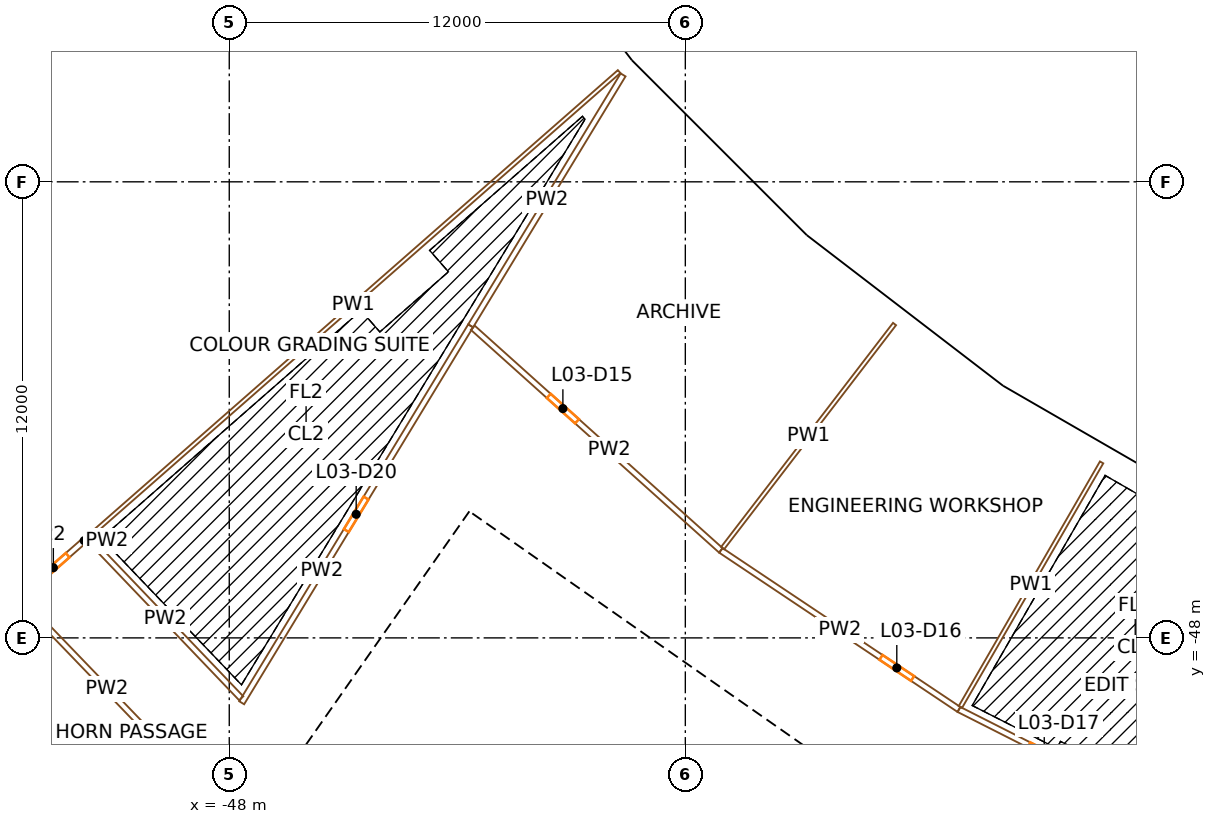
"""IFC4 building model, lengths in metres.
Left out: names, types, materials, properties, quantities, classifications, styles, units other than length and angle.
Written with IfcOpenShell. Run it as: python <this file> out.ifc"""

import sys

from ifc_helpers import new_model, si_unit, direction, frame, frame_2d, origin, origin_2d, place, context, subcontext, project, spatial, rectangle, extrude, element, fill, save


model = new_model("IFC4")
c1 = context("Model", 3, precision=1e-05, world=origin(), true_north=direction((0.0, 1.0)))
c2 = subcontext(c1, "Body", "Model", "MODEL_VIEW")
j1 = project(units=[si_unit("LENGTHUNIT", "METRE"), si_unit("PLANEANGLEUNIT", "RADIAN")], contexts=[c1])
p1 = place(None, origin())
s1 = spatial("IfcSite", under=j1, at=p1, CompositionType="ELEMENT")
p2 = place(p1, origin())
s2 = spatial("IfcBuilding", under=s1, at=p2, CompositionType="ELEMENT")
p3 = place(p2, frame((0.0, 0.0, 27.0)))
s3 = spatial("IfcBuildingStorey", under=s2, at=p3, CompositionType="ELEMENT", Elevation=27.0)
p4 = place(p3, frame((-48.433, -32.362, 0.0), z_axis=(0.0, 0.0, 1.0), x_axis=(0.55557023302, -0.831469612303, 0.0)))
e1 = element("IfcColumn", 1, at=p4, inside=s3, PredefinedType="COLUMN", context=c2, shape_type="SweptSolid", body=[
    extrude(rectangle(XDim=1.4, YDim=1.8, at=origin_2d()), origin(), (0.0, 0.0, 1.0), 4.5),
])
p5 = place(p3, frame((-38.156, -33.462, 0.0), z_axis=(0.0, 0.0, 1.0), x_axis=(0.6593458151, -0.751839807479, 0.0)))
e2 = element("IfcColumn", 2, at=p5, inside=s3, PredefinedType="COLUMN", context=c2, shape_type="SweptSolid", body=[
    extrude(rectangle(XDim=1.1, YDim=1.3, at=origin_2d()), origin(), (0.0, 0.0, 1.0), 4.5),
])
p6 = place(p3, frame((-43.795, -38.407, 0.0), z_axis=(0.0, 0.0, 1.0), x_axis=(0.6593458151, -0.751839807479, 0.0)))
e3 = element("IfcColumn", 3, at=p6, inside=s3, PredefinedType="COLUMN", context=c2, shape_type="SweptSolid", body=[
    extrude(rectangle(XDim=1.4, YDim=1.8, at=origin_2d()), origin(), (0.0, 0.0, 1.0), 4.5),
])
p7 = place(p3, frame((-33.462, -38.156, 0.0), z_axis=(0.0, 0.0, 1.0), x_axis=(0.751839807479, -0.6593458151, 0.0)))
e4 = element("IfcColumn", 4, at=p7, inside=s3, PredefinedType="COLUMN", context=c2, shape_type="SweptSolid", body=[
    extrude(rectangle(XDim=1.1, YDim=1.3, at=origin_2d()), origin(), (0.0, 0.0, 1.0), 4.5),
])
p8 = place(p3, frame((-38.407, -43.795, 0.0), z_axis=(0.0, 0.0, 1.0), x_axis=(0.751839807479, -0.6593458151, 0.0)))
e5 = element("IfcColumn", 5, at=p8, inside=s3, PredefinedType="COLUMN", context=c2, shape_type="SweptSolid", body=[
    extrude(rectangle(XDim=1.4, YDim=1.8, at=origin_2d()), origin(), (0.0, 0.0, 1.0), 4.5),
])
p9 = place(p3, frame((-28.195, -42.197, 0.0), z_axis=(0.0, 0.0, 1.0), x_axis=(0.831469612303, -0.55557023302, 0.0)))
e6 = element("IfcColumn", 6, at=p9, inside=s3, PredefinedType="COLUMN", context=c2, shape_type="SweptSolid", body=[
    extrude(rectangle(XDim=1.1, YDim=1.3, at=origin_2d()), origin(), (0.0, 0.0, 1.0), 4.5),
])
p10 = place(p3, frame((-32.362, -48.433, 0.0), z_axis=(0.0, 0.0, 1.0), x_axis=(0.831469612303, -0.55557023302, 0.0)))
e7 = element("IfcColumn", 7, at=p10, inside=s3, PredefinedType="COLUMN", context=c2, shape_type="SweptSolid", body=[
    extrude(rectangle(XDim=1.4, YDim=1.8, at=origin_2d()), origin(), (0.0, 0.0, 1.0), 4.5),
])
p11 = place(p3, frame((-49.779, -57.191, 0.0), z_axis=(0.0, 0.0, 1.0), x_axis=(0.573577477574, 0.819151315216, 0.0)))
e8 = element("IfcWall", 8, at=p11, inside=s3, PredefinedType="SHEAR", context=c2, shape_type="SweptSolid", body=[
    extrude(rectangle(XDim=14.8, YDim=0.9, at=frame_2d((7.4, 0.0))), origin(), (0.0, 0.0, 1.0), 4.1),
])
p12 = place(p11, frame((6.7, 0.0, 0.0)))
e9 = element("IfcOpeningElement", 9, at=p12, cuts=e8, PredefinedType="OPENING", context=c2, shape_type="SweptSolid", body=[
    extrude(rectangle(XDim=1.4, YDim=2.1, at=frame_2d((0.7, 1.05))), frame((0.0, 0.46, 0.0), z_axis=(0.0, -1.0, 0.0), x_axis=(1.0, 0.0, 0.0)), (0.0, 0.0, 1.0), 0.92),
])
p13 = place(p3, frame((-28.854, -54.324, 0.0), z_axis=(0.0, 0.0, 1.0), x_axis=(-0.819145767589, 0.573585400304, 0.0)))
e10 = element("IfcWall", 10, at=p13, inside=s3, PredefinedType="SHEAR", context=c2, shape_type="SweptSolid", body=[
    extrude(rectangle(XDim=15.045, YDim=0.9, at=frame_2d((7.523, 0.0))), origin(), (0.0, 0.0, 1.0), 4.1),
])
p14 = place(p13, frame((0.6, 0.0, 0.0)))
e11 = element("IfcOpeningElement", 11, at=p14, cuts=e10, PredefinedType="OPENING", context=c2, shape_type="SweptSolid", body=[
    extrude(rectangle(XDim=1.0, YDim=2.1, at=frame_2d((0.5, 1.05))), frame((0.0, 0.46, 0.0), z_axis=(0.0, -1.0, 0.0), x_axis=(1.0, 0.0, 0.0)), (0.0, 0.0, 1.0), 0.92),
])
p15 = place(p13, frame((3.275, 0.0, 0.0)))
e12 = element("IfcOpeningElement", 12, at=p15, cuts=e10, PredefinedType="OPENING", context=c2, shape_type="SweptSolid", body=[
    extrude(rectangle(XDim=1.0, YDim=2.1, at=frame_2d((0.5, 1.05))), frame((0.0, 0.46, 0.0), z_axis=(0.0, -1.0, 0.0), x_axis=(1.0, 0.0, 0.0)), (0.0, 0.0, 1.0), 0.92),
])
p16 = place(p13, frame((6.225, 0.0, 0.0)))
e13 = element("IfcOpeningElement", 13, at=p16, cuts=e10, PredefinedType="OPENING", context=c2, shape_type="SweptSolid", body=[
    extrude(rectangle(XDim=0.9, YDim=2.1, at=frame_2d((0.45, 1.05))), frame((0.0, 0.46, 0.0), z_axis=(0.0, -1.0, 0.0), x_axis=(1.0, 0.0, 0.0)), (0.0, 0.0, 1.0), 0.92),
])
p17 = place(p13, frame((13.495, 0.0, 0.0)))
e14 = element("IfcOpeningElement", 14, at=p17, cuts=e10, PredefinedType="OPENING", context=c2, shape_type="SweptSolid", body=[
    extrude(rectangle(XDim=1.1, YDim=2.1, at=frame_2d((0.55, 1.05))), frame((0.0, 0.46, 0.0), z_axis=(0.0, -1.0, 0.0), x_axis=(1.0, 0.0, 0.0)), (0.0, 0.0, 1.0), 0.92),
])
p18 = place(p3, frame((-43.204, -60.696, 0.0), z_axis=(0.0, 0.0, 1.0), x_axis=(0.573571992966, 0.819155155563, 0.0)))
e15 = element("IfcWall", 15, at=p18, inside=s3, PredefinedType="SOLIDWALL", context=c2, shape_type="SweptSolid", body=[
    extrude(rectangle(XDim=13.0, YDim=0.3, at=frame_2d((6.5, 0.0))), origin(), (0.0, 0.0, 1.0), 4.1),
])
p19 = place(p3, frame((-37.936, -52.91, 0.0), z_axis=(0.0, 0.0, 1.0), x_axis=(-0.819147518138, 0.57358290031, 0.0)))
e16 = element("IfcWall", 16, at=p19, inside=s3, PredefinedType="SOLIDWALL", context=c2, shape_type="SweptSolid", body=[
    extrude(rectangle(XDim=6.795, YDim=0.3, at=frame_2d((3.398, 0.0))), origin(), (0.0, 0.0, 1.0), 4.1),
])
p20 = place(p19, frame((5.32, 0.0, 0.0)))
e17 = element("IfcOpeningElement", 17, at=p20, cuts=e16, PredefinedType="OPENING", context=c2, shape_type="SweptSolid", body=[
    extrude(rectangle(XDim=1.1, YDim=2.1, at=frame_2d((0.55, 1.05))), frame((0.0, 0.16, 0.0), z_axis=(0.0, -1.0, 0.0), x_axis=(1.0, 0.0, 0.0)), (0.0, 0.0, 1.0), 0.32),
])
p21 = place(p3, frame((-37.555, -32.975, 0.0), z_axis=(0.0, 0.0, 1.0), x_axis=(-0.608780327927, 0.793338838284, 0.0)))
e18 = element("IfcWall", 18, at=p21, inside=s3, PredefinedType="SOLIDWALL", context=c2, shape_type="SweptSolid", body=[
    extrude(rectangle(XDim=6.597, YDim=0.45, at=frame_2d((3.298, 0.0))), origin(), (0.0, 0.0, 1.0), 3.2),
])
p22 = place(p21, frame((3.749, 0.0, 0.9)))
e19 = element("IfcOpeningElement", 19, at=p22, cuts=e18, PredefinedType="OPENING", context=c2, shape_type="SweptSolid", body=[
    extrude(rectangle(XDim=1.2, YDim=2.15, at=frame_2d((0.6, 1.075))), frame((0.0, 0.235, 0.0), z_axis=(0.0, -1.0, 0.0), x_axis=(1.0, 0.0, 0.0)), (0.0, 0.0, 1.0), 0.47),
])
p23 = place(p21, frame((1.648, 0.0, 0.9)))
e20 = element("IfcOpeningElement", 20, at=p23, cuts=e18, PredefinedType="OPENING", context=c2, shape_type="SweptSolid", body=[
    extrude(rectangle(XDim=1.2, YDim=2.15, at=frame_2d((0.6, 1.075))), frame((0.0, 0.235, 0.0), z_axis=(0.0, -1.0, 0.0), x_axis=(1.0, 0.0, 0.0)), (0.0, 0.0, 1.0), 0.47),
])
p24 = place(p3, frame((-32.993, -37.532, 0.0), z_axis=(0.0, 0.0, 1.0), x_axis=(-0.707106781187, 0.707106781187, 0.0)))
e21 = element("IfcWall", 21, at=p24, inside=s3, PredefinedType="SOLIDWALL", context=c2, shape_type="SweptSolid", body=[
    extrude(rectangle(XDim=6.419, YDim=0.45, at=frame_2d((3.209, 0.0))), origin(), (0.0, 0.0, 1.0), 3.2),
])
p25 = place(p24, frame((3.66, 0.0, 0.9)))
e22 = element("IfcOpeningElement", 22, at=p25, cuts=e21, PredefinedType="OPENING", context=c2, shape_type="SweptSolid", body=[
    extrude(rectangle(XDim=1.2, YDim=2.15, at=frame_2d((0.6, 1.075))), frame((0.0, 0.235, 0.0), z_axis=(0.0, -1.0, 0.0), x_axis=(1.0, 0.0, 0.0)), (0.0, 0.0, 1.0), 0.47),
])
p26 = place(p24, frame((1.56, 0.0, 0.9)))
e23 = element("IfcOpeningElement", 23, at=p26, cuts=e21, PredefinedType="OPENING", context=c2, shape_type="SweptSolid", body=[
    extrude(rectangle(XDim=1.2, YDim=2.15, at=frame_2d((0.6, 1.075))), frame((0.0, 0.235, 0.0), z_axis=(0.0, -1.0, 0.0), x_axis=(1.0, 0.0, 0.0)), (0.0, 0.0, 1.0), 0.47),
])
p27 = place(p3, frame((-27.741, -41.571, 0.0), z_axis=(0.0, 0.0, 1.0), x_axis=(-0.793338838284, 0.608780327927, 0.0)))
e24 = element("IfcWall", 24, at=p27, inside=s3, PredefinedType="SOLIDWALL", context=c2, shape_type="SweptSolid", body=[
    extrude(rectangle(XDim=6.597, YDim=0.45, at=frame_2d((3.298, 0.0))), origin(), (0.0, 0.0, 1.0), 3.2),
])
p28 = place(p27, frame((3.749, 0.0, 0.9)))
e25 = element("IfcOpeningElement", 25, at=p28, cuts=e24, PredefinedType="OPENING", context=c2, shape_type="SweptSolid", body=[
    extrude(rectangle(XDim=1.2, YDim=2.15, at=frame_2d((0.6, 1.075))), frame((0.0, 0.235, 0.0), z_axis=(0.0, -1.0, 0.0), x_axis=(1.0, 0.0, 0.0)), (0.0, 0.0, 1.0), 0.47),
])
p29 = place(p27, frame((1.648, 0.0, 0.9)))
e26 = element("IfcOpeningElement", 26, at=p29, cuts=e24, PredefinedType="OPENING", context=c2, shape_type="SweptSolid", body=[
    extrude(rectangle(XDim=1.2, YDim=2.15, at=frame_2d((0.6, 1.075))), frame((0.0, 0.235, 0.0), z_axis=(0.0, -1.0, 0.0), x_axis=(1.0, 0.0, 0.0)), (0.0, 0.0, 1.0), 0.47),
])
p30 = place(p3, frame((-22.155, -44.792, 0.0), z_axis=(0.0, 0.0, 1.0), x_axis=(-0.866022817921, 0.50000447882, 0.0)))
e27 = element("IfcWall", 27, at=p30, inside=s3, PredefinedType="SOLIDWALL", context=c2, shape_type="SweptSolid", body=[
    extrude(rectangle(XDim=6.419, YDim=0.45, at=frame_2d((3.21, 0.0))), origin(), (0.0, 0.0, 1.0), 3.2),
])
p31 = place(p30, frame((3.66, 0.0, 0.9)))
e28 = element("IfcOpeningElement", 28, at=p31, cuts=e27, PredefinedType="OPENING", context=c2, shape_type="SweptSolid", body=[
    extrude(rectangle(XDim=1.2, YDim=2.15, at=frame_2d((0.6, 1.075))), frame((0.0, 0.235, 0.0), z_axis=(0.0, -1.0, 0.0), x_axis=(1.0, 0.0, 0.0)), (0.0, 0.0, 1.0), 0.47),
])
p32 = place(p30, frame((1.56, 0.0, 0.9)))
e29 = element("IfcOpeningElement", 29, at=p32, cuts=e27, PredefinedType="OPENING", context=c2, shape_type="SweptSolid", body=[
    extrude(rectangle(XDim=1.2, YDim=2.15, at=frame_2d((0.6, 1.075))), frame((0.0, 0.235, 0.0), z_axis=(0.0, -1.0, 0.0), x_axis=(1.0, 0.0, 0.0)), (0.0, 0.0, 1.0), 0.47),
])
p33 = place(p3, frame((-53.531, -46.945, 0.0), z_axis=(0.0, 0.0, 1.0), x_axis=(0.751876772813, 0.659303661832, 0.0)))
e30 = element("IfcWall", 30, at=p33, inside=s3, PredefinedType="PARTITIONING", context=c2, shape_type="SweptSolid", body=[
    extrude(rectangle(XDim=2.4, YDim=0.15, at=frame_2d((1.2, 0.0))), origin(), (0.0, 0.0, 1.0), 3.1),
])
p34 = place(p33, frame((0.7, 0.0, 0.0)))
e31 = element("IfcOpeningElement", 31, at=p34, cuts=e30, PredefinedType="OPENING", context=c2, shape_type="SweptSolid", body=[
    extrude(rectangle(XDim=1.0, YDim=2.1, at=frame_2d((0.5, 1.05))), frame((0.0, 0.085, 0.0), z_axis=(0.0, -1.0, 0.0), x_axis=(1.0, 0.0, 0.0)), (0.0, 0.0, 1.0), 0.17),
])
p35 = place(p3, frame((-51.727, -45.363, 0.0), z_axis=(0.0, 0.0, 1.0), x_axis=(0.751835479309, 0.659350750399, 0.0)))
e32 = element("IfcWall", 32, at=p35, inside=s3, PredefinedType="PARTITIONING", context=c2, shape_type="SweptSolid", body=[
    extrude(rectangle(XDim=18.6, YDim=0.1, at=frame_2d((9.3, 0.0))), origin(), (0.0, 0.0, 1.0), 3.1),
])
p36 = place(p3, frame((-48.961, -51.689, 0.0), z_axis=(0.0, 0.0, 1.0), x_axis=(-0.693805223412, 0.72016269826, 0.0)))
e33 = element("IfcWall", 33, at=p36, inside=s3, PredefinedType="PARTITIONING", context=c2, shape_type="SweptSolid", body=[
    extrude(rectangle(XDim=6.512, YDim=0.15, at=frame_2d((3.256, 0.0))), origin(), (0.0, 0.0, 1.0), 3.1),
])
p37 = place(p3, frame((-47.686, -49.589, 0.0), z_axis=(0.0, 0.0, 1.0), x_axis=(-0.691111241065, 0.722748401917, 0.0)))
e34 = element("IfcWall", 34, at=p37, inside=s3, PredefinedType="PARTITIONING", context=c2, shape_type="SweptSolid", body=[
    extrude(rectangle(XDim=5.772, YDim=0.15, at=frame_2d((2.886, 0.0))), origin(), (0.0, 0.0, 1.0), 3.1),
])
p38 = place(p3, frame((-47.673, -49.708, 0.0), z_axis=(0.0, 0.0, 1.0), x_axis=(0.519159839294, 0.854677167862, 0.0)))
e35 = element("IfcWall", 35, at=p38, inside=s3, PredefinedType="PARTITIONING", context=c2, shape_type="SweptSolid", body=[
    extrude(rectangle(XDim=11.605, YDim=0.15, at=frame_2d((5.802, 0.0))), origin(), (0.0, 0.0, 1.0), 3.1),
])
p39 = place(p38, frame((5.302, 0.0, 0.0)))
e36 = element("IfcOpeningElement", 36, at=p39, cuts=e35, PredefinedType="OPENING", context=c2, shape_type="SweptSolid", body=[
    extrude(rectangle(XDim=1.0, YDim=2.1, at=frame_2d((0.5, 1.05))), frame((0.0, 0.085, 0.0), z_axis=(0.0, -1.0, 0.0), x_axis=(1.0, 0.0, 0.0)), (0.0, 0.0, 1.0), 0.17),
])
p40 = place(p3, frame((-41.592, -39.839, 0.0), z_axis=(0.0, 0.0, 1.0), x_axis=(0.744252572607, -0.667898276812, 0.0)))
e37 = element("IfcWall", 37, at=p40, inside=s3, PredefinedType="PARTITIONING", context=c2, shape_type="SweptSolid", body=[
    extrude(rectangle(XDim=8.771, YDim=0.15, at=frame_2d((4.385, 0.0))), origin(), (0.0, 0.0, 1.0), 3.1),
])
p41 = place(p40, frame((2.685, 0.0, 0.0)))
e38 = element("IfcOpeningElement", 38, at=p41, cuts=e37, PredefinedType="OPENING", context=c2, shape_type="SweptSolid", body=[
    extrude(rectangle(XDim=1.0, YDim=2.1, at=frame_2d((0.5, 1.05))), frame((0.0, 0.085, 0.0), z_axis=(0.0, -1.0, 0.0), x_axis=(1.0, 0.0, 0.0)), (0.0, 0.0, 1.0), 0.17),
])
p42 = place(p3, frame((-37.638, -33.187, 0.0), z_axis=(0.0, 0.0, 1.0), x_axis=(-0.519163683086, -0.854674833, 0.0)))
e39 = element("IfcWall", 39, at=p42, inside=s3, PredefinedType="PARTITIONING", context=c2, shape_type="SweptSolid", body=[
    extrude(rectangle(XDim=7.725, YDim=0.15, at=frame_2d((3.862, 0.0))), origin(), (0.0, 0.0, 1.0), 3.1),
])
p43 = place(p3, frame((-35.065, -45.697, 0.0), z_axis=(0.0, 0.0, 1.0), x_axis=(0.831476555368, -0.555559841847, 0.0)))
e40 = element("IfcWall", 40, at=p43, inside=s3, PredefinedType="PARTITIONING", context=c2, shape_type="SweptSolid", body=[
    extrude(rectangle(XDim=7.534, YDim=0.15, at=frame_2d((3.767, 0.0))), origin(), (0.0, 0.0, 1.0), 3.1),
])
p44 = place(p43, frame((5.067, 0.0, 0.0)))
e41 = element("IfcOpeningElement", 41, at=p44, cuts=e40, PredefinedType="OPENING", context=c2, shape_type="SweptSolid", body=[
    extrude(rectangle(XDim=1.0, YDim=2.1, at=frame_2d((0.5, 1.05))), frame((0.0, 0.085, 0.0), z_axis=(0.0, -1.0, 0.0), x_axis=(1.0, 0.0, 0.0)), (0.0, 0.0, 1.0), 0.17),
])
p45 = place(p3, frame((-30.495, -39.742, 0.0), z_axis=(0.0, 0.0, 1.0), x_axis=(-0.60877839598, -0.793340320788, 0.0)))
e42 = element("IfcWall", 42, at=p45, inside=s3, PredefinedType="PARTITIONING", context=c2, shape_type="SweptSolid", body=[
    extrude(rectangle(XDim=7.432, YDim=0.1, at=frame_2d((3.716, 0.0))), origin(), (0.0, 0.0, 1.0), 3.1),
])
p46 = place(p3, frame((-28.8, -49.883, 0.0), z_axis=(0.0, 0.0, 1.0), x_axis=(0.892095791335, -0.451846322418, 0.0)))
e43 = element("IfcWall", 43, at=p46, inside=s3, PredefinedType="PARTITIONING", context=c2, shape_type="SweptSolid", body=[
    extrude(rectangle(XDim=6.231, YDim=0.15, at=frame_2d((3.116, 0.0))), origin(), (0.0, 0.0, 1.0), 3.1),
])
p47 = place(p46, frame((2.066, 0.0, 0.0)))
e44 = element("IfcOpeningElement", 44, at=p47, cuts=e43, PredefinedType="OPENING", context=c2, shape_type="SweptSolid", body=[
    extrude(rectangle(XDim=0.9, YDim=2.1, at=frame_2d((0.45, 1.05))), frame((0.0, 0.085, 0.0), z_axis=(0.0, -1.0, 0.0), x_axis=(1.0, 0.0, 0.0)), (0.0, 0.0, 1.0), 0.17),
])
p48 = place(p3, frame((-25.047, -43.382, 0.0), z_axis=(0.0, 0.0, 1.0), x_axis=(-0.500011569389, -0.866018724091, 0.0)))
e45 = element("IfcWall", 45, at=p48, inside=s3, PredefinedType="PARTITIONING", context=c2, shape_type="SweptSolid", body=[
    extrude(rectangle(XDim=7.431, YDim=0.1, at=frame_2d((3.716, 0.0))), origin(), (0.0, 0.0, 1.0), 3.1),
])
p49 = place(p16, origin())
e46 = element("IfcDoor", 46, at=p49, inside=s3, OperationType="SINGLE_SWING_RIGHT", PredefinedType="DOOR", context=c2, shape_type="SweptSolid", body=[
    extrude(rectangle(XDim=0.9, YDim=2.1, at=frame_2d((0.45, 1.05))), frame((0.0, 0.025, 0.0), z_axis=(0.0, -1.0, 0.0), x_axis=(1.0, 0.0, 0.0)), (0.0, 0.0, 1.0), 0.05),
])
fill(e13, e46)
p50 = place(p12, origin())
e47 = element("IfcDoor", 47, at=p50, inside=s3, OperationType="DOUBLE_DOOR_SINGLE_SWING", PredefinedType="DOOR", context=c2, shape_type="SweptSolid", body=[
    extrude(rectangle(XDim=1.4, YDim=2.1, at=frame_2d((0.7, 1.05))), frame((0.0, 0.025, 0.0), z_axis=(0.0, -1.0, 0.0), x_axis=(1.0, 0.0, 0.0)), (0.0, 0.0, 1.0), 0.05),
])
fill(e9, e47)
p51 = place(p17, origin())
e48 = element("IfcDoor", 48, at=p51, inside=s3, OperationType="SINGLE_SWING_RIGHT", PredefinedType="DOOR", context=c2, shape_type="SweptSolid", body=[
    extrude(rectangle(XDim=1.1, YDim=2.1, at=frame_2d((0.55, 1.05))), frame((0.0, 0.025, 0.0), z_axis=(0.0, -1.0, 0.0), x_axis=(1.0, 0.0, 0.0)), (0.0, 0.0, 1.0), 0.05),
])
fill(e14, e48)
p52 = place(p20, origin())
e49 = element("IfcDoor", 49, at=p52, inside=s3, OperationType="SINGLE_SWING_RIGHT", PredefinedType="DOOR", context=c2, shape_type="SweptSolid", body=[
    extrude(rectangle(XDim=1.1, YDim=2.1, at=frame_2d((0.55, 1.05))), frame((0.0, 0.025, 0.0), z_axis=(0.0, -1.0, 0.0), x_axis=(1.0, 0.0, 0.0)), (0.0, 0.0, 1.0), 0.05),
])
fill(e17, e49)
p53 = place(p25, origin())
e50 = element("IfcWindow", 50, at=p53, inside=s3, PartitioningType="SINGLE_PANEL", PredefinedType="WINDOW", context=c2, shape_type="SweptSolid", body=[
    extrude(rectangle(XDim=1.2, YDim=2.15, at=frame_2d((0.6, 1.075))), frame((0.0, 0.03, 0.0), z_axis=(0.0, -1.0, 0.0), x_axis=(1.0, 0.0, 0.0)), (0.0, 0.0, 1.0), 0.06),
])
fill(e22, e50)
p54 = place(p26, origin())
e51 = element("IfcWindow", 51, at=p54, inside=s3, PartitioningType="SINGLE_PANEL", PredefinedType="WINDOW", context=c2, shape_type="SweptSolid", body=[
    extrude(rectangle(XDim=1.2, YDim=2.15, at=frame_2d((0.6, 1.075))), frame((0.0, 0.03, 0.0), z_axis=(0.0, -1.0, 0.0), x_axis=(1.0, 0.0, 0.0)), (0.0, 0.0, 1.0), 0.06),
])
fill(e23, e51)
p55 = place(p28, origin())
e52 = element("IfcWindow", 52, at=p55, inside=s3, PartitioningType="SINGLE_PANEL", PredefinedType="WINDOW", context=c2, shape_type="SweptSolid", body=[
    extrude(rectangle(XDim=1.2, YDim=2.15, at=frame_2d((0.6, 1.075))), frame((0.0, 0.03, 0.0), z_axis=(0.0, -1.0, 0.0), x_axis=(1.0, 0.0, 0.0)), (0.0, 0.0, 1.0), 0.06),
])
fill(e25, e52)
p56 = place(p29, origin())
e53 = element("IfcWindow", 53, at=p56, inside=s3, PartitioningType="SINGLE_PANEL", PredefinedType="WINDOW", context=c2, shape_type="SweptSolid", body=[
    extrude(rectangle(XDim=1.2, YDim=2.15, at=frame_2d((0.6, 1.075))), frame((0.0, 0.03, 0.0), z_axis=(0.0, -1.0, 0.0), x_axis=(1.0, 0.0, 0.0)), (0.0, 0.0, 1.0), 0.06),
])
fill(e26, e53)
p57 = place(p31, origin())
e54 = element("IfcWindow", 54, at=p57, inside=s3, PartitioningType="SINGLE_PANEL", PredefinedType="WINDOW", context=c2, shape_type="SweptSolid", body=[
    extrude(rectangle(XDim=1.2, YDim=2.15, at=frame_2d((0.6, 1.075))), frame((0.0, 0.03, 0.0), z_axis=(0.0, -1.0, 0.0), x_axis=(1.0, 0.0, 0.0)), (0.0, 0.0, 1.0), 0.06),
])
fill(e28, e54)
p58 = place(p32, origin())
e55 = element("IfcWindow", 55, at=p58, inside=s3, PartitioningType="SINGLE_PANEL", PredefinedType="WINDOW", context=c2, shape_type="SweptSolid", body=[
    extrude(rectangle(XDim=1.2, YDim=2.15, at=frame_2d((0.6, 1.075))), frame((0.0, 0.03, 0.0), z_axis=(0.0, -1.0, 0.0), x_axis=(1.0, 0.0, 0.0)), (0.0, 0.0, 1.0), 0.06),
])
fill(e29, e55)
p59 = place(p41, origin())
e56 = element("IfcDoor", 56, at=p59, inside=s3, OperationType="SINGLE_SWING_LEFT", PredefinedType="DOOR", context=c2, shape_type="SweptSolid", body=[
    extrude(rectangle(XDim=1.0, YDim=2.1, at=frame_2d((0.5, 1.05))), frame((0.0, 0.025, 0.0), z_axis=(0.0, -1.0, 0.0), x_axis=(1.0, 0.0, 0.0)), (0.0, 0.0, 1.0), 0.05),
])
fill(e38, e56)
p60 = place(p44, origin())
e57 = element("IfcDoor", 57, at=p60, inside=s3, OperationType="SINGLE_SWING_RIGHT", PredefinedType="DOOR", context=c2, shape_type="SweptSolid", body=[
    extrude(rectangle(XDim=1.0, YDim=2.1, at=frame_2d((0.5, 1.05))), frame((0.0, 0.025, 0.0), z_axis=(0.0, -1.0, 0.0), x_axis=(1.0, 0.0, 0.0)), (0.0, 0.0, 1.0), 0.05),
])
fill(e41, e57)
p61 = place(p47, origin())
e58 = element("IfcDoor", 58, at=p61, inside=s3, OperationType="SINGLE_SWING_LEFT", PredefinedType="DOOR", context=c2, shape_type="SweptSolid", body=[
    extrude(rectangle(XDim=0.9, YDim=2.1, at=frame_2d((0.45, 1.05))), frame((0.0, 0.025, 0.0), z_axis=(0.0, -1.0, 0.0), x_axis=(1.0, 0.0, 0.0)), (0.0, 0.0, 1.0), 0.05),
])
fill(e44, e58)
p62 = place(p39, origin())
e59 = element("IfcDoor", 59, at=p62, inside=s3, OperationType="SINGLE_SWING_RIGHT", PredefinedType="DOOR", context=c2, shape_type="SweptSolid", body=[
    extrude(rectangle(XDim=1.0, YDim=2.1, at=frame_2d((0.5, 1.05))), frame((0.0, 0.025, 0.0), z_axis=(0.0, -1.0, 0.0), x_axis=(1.0, 0.0, 0.0)), (0.0, 0.0, 1.0), 0.05),
])
fill(e36, e59)
p63 = place(p34, origin())
e60 = element("IfcDoor", 60, at=p63, inside=s3, OperationType="SINGLE_SWING_RIGHT", PredefinedType="DOOR", context=c2, shape_type="SweptSolid", body=[
    extrude(rectangle(XDim=1.0, YDim=2.1, at=frame_2d((0.5, 1.05))), frame((0.0, 0.025, 0.0), z_axis=(0.0, -1.0, 0.0), x_axis=(1.0, 0.0, 0.0)), (0.0, 0.0, 1.0), 0.05),
])
fill(e31, e60)
save(model, sys.argv[1])
